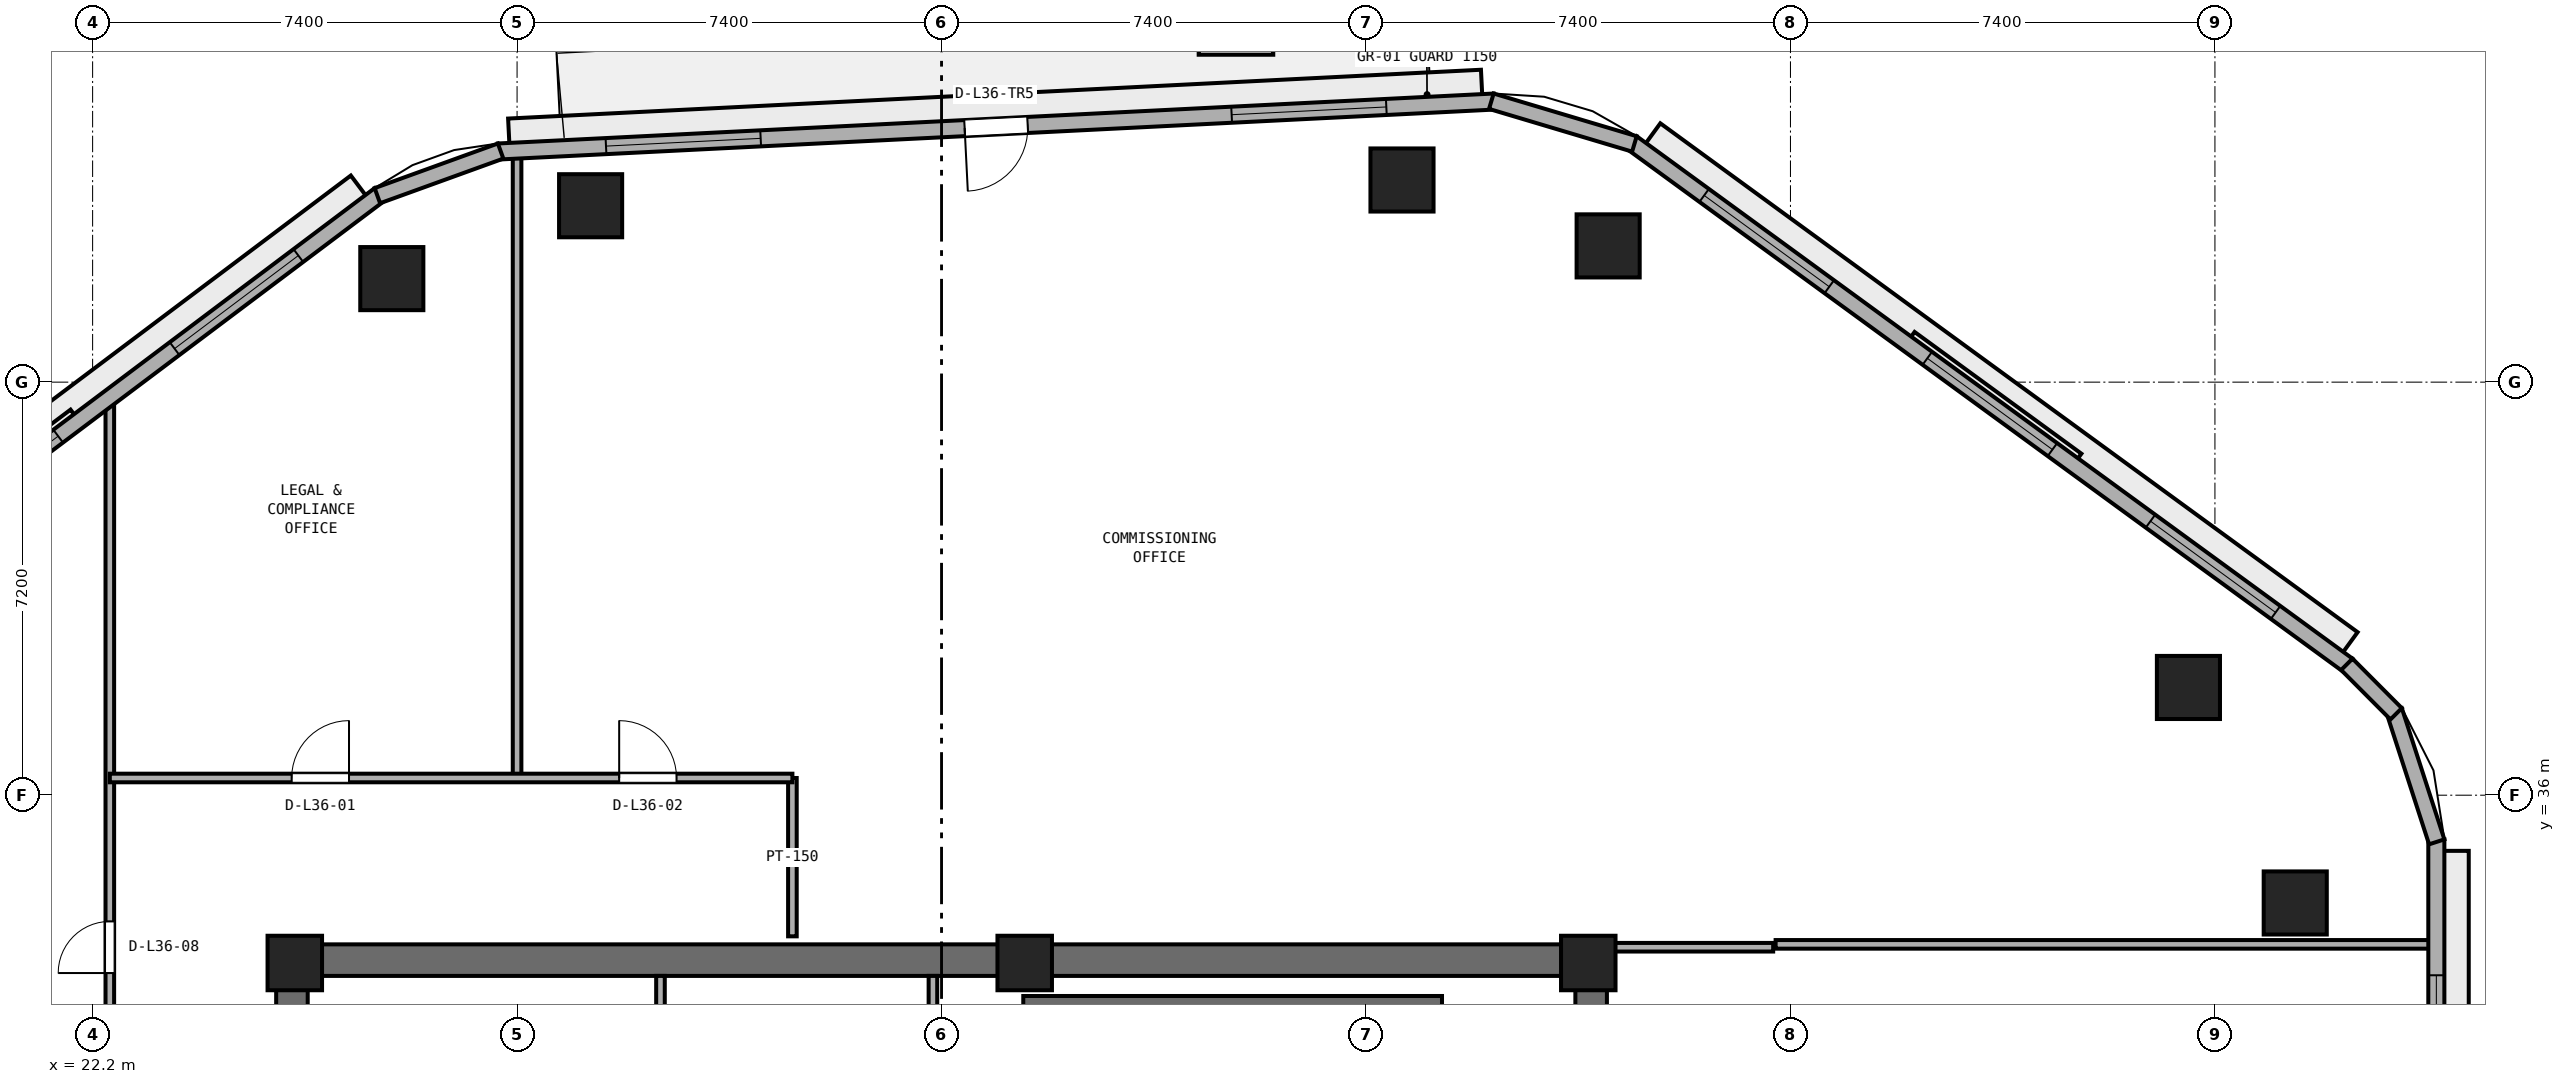
"""IFC4 building model, lengths in metres.
Left out: names, types, materials, properties, quantities, classifications, styles, units other than length and angle.
Written with IfcOpenShell. Run it as: python <this file> out.ifc"""

import sys

from ifc_helpers import new_model, si_unit, direction, frame, frame_2d, origin, origin_2d, place, context, subcontext, project, spatial, rectangle, extrude, element, fill, save


model = new_model("IFC4")
c1 = context("Model", 3, precision=1e-05, world=origin(), true_north=direction((0.0, 1.0)))
c2 = subcontext(c1, "Body", "Model", "MODEL_VIEW")
j1 = project(units=[si_unit("LENGTHUNIT", "METRE"), si_unit("PLANEANGLEUNIT", "RADIAN")], contexts=[c1])
p1 = place(None, origin())
s1 = spatial("IfcSite", under=j1, at=p1, CompositionType="ELEMENT")
p2 = place(p1, origin())
s2 = spatial("IfcBuilding", under=s1, at=p2, CompositionType="ELEMENT")
p3 = place(p2, frame((0.0, 0.0, 144.0)))
s3 = spatial("IfcBuildingStorey", under=s2, at=p3, CompositionType="ELEMENT", Elevation=144.0)
p4 = place(p3, frame((25.4, 33.125, 0.0), z_axis=(0.0, 0.0, 1.0), x_axis=(1.0, 0.0, 0.0)))
e1 = element("IfcWall", 1, at=p4, inside=s3, PredefinedType="SHEAR", context=c2, shape_type="SweptSolid", body=[
    extrude(rectangle(XDim=23.2, YDim=0.55, at=frame_2d((11.6, 0.0))), origin(), (0.0, 0.0, 1.0), 3.54),
])
p5 = place(p3, frame((25.675, 17.55, 0.0), z_axis=(0.0, 0.0, 1.0), x_axis=(0.0, 1.0, 0.0)))
e2 = element("IfcWall", 2, at=p5, inside=s3, PredefinedType="SHEAR", context=c2, shape_type="SweptSolid", body=[
    extrude(rectangle(XDim=15.3, YDim=0.55, at=frame_2d((7.65, 0.0))), origin(), (0.0, 0.0, 1.0), 3.54),
])
p6 = place(p5, frame((6.9, 0.0, 0.0)))
e3 = element("IfcOpeningElement", 3, at=p6, cuts=e2, PredefinedType="OPENING", context=c2, shape_type="SweptSolid", body=[
    extrude(rectangle(XDim=1.5, YDim=2.15, at=frame_2d((0.75, 1.075))), frame((0.0, 0.285, 0.0), z_axis=(0.0, -1.0, 0.0), x_axis=(1.0, 0.0, 0.0)), (0.0, 0.0, 1.0), 0.57),
])
p7 = place(p3, frame((48.325, 17.55, 0.0), z_axis=(0.0, 0.0, 1.0), x_axis=(0.0, 1.0, 0.0)))
e4 = element("IfcWall", 4, at=p7, inside=s3, PredefinedType="SHEAR", context=c2, shape_type="SweptSolid", body=[
    extrude(rectangle(XDim=15.3, YDim=0.55, at=frame_2d((7.65, 0.0))), origin(), (0.0, 0.0, 1.0), 3.54),
])
p8 = place(p7, frame((5.75, 0.0, 0.0)))
e5 = element("IfcOpeningElement", 5, at=p8, cuts=e4, PredefinedType="OPENING", context=c2, shape_type="SweptSolid", body=[
    extrude(rectangle(XDim=1.5, YDim=2.15, at=frame_2d((0.75, 1.075))), frame((0.0, 0.285, 0.0), z_axis=(0.0, -1.0, 0.0), x_axis=(1.0, 0.0, 0.0)), (0.0, 0.0, 1.0), 0.57),
])
for number, where, z_axis, x_axis in (
    (6, (48.275, 33.075, 0.0), (0.0, 0.0, 1.0), (1.0, 0.0, 0.0)),
    (7, (38.45, 33.075, 0.0), (0.0, 0.0, 1.0), (1.0, 0.0, 0.0)),
    (8, (25.725, 33.075, 0.0), (0.0, 0.0, 1.0), (1.0, 0.0, 0.0)),
):
    element("IfcColumn", number, at=place(p3, frame(where, z_axis=z_axis, x_axis=x_axis)), inside=s3, PredefinedType="PILASTER", context=c2, shape_type="SweptSolid", body=[
        extrude(rectangle(XDim=0.95, YDim=0.95, at=origin_2d()), origin(), (0.0, 0.0, 1.0), 3.8),
    ])
for number, where, z_axis, x_axis in (
    (9, (60.6, 34.122, 0.0), (0.0, 0.0, 1.0), (1.0, 0.0, 0.0)),
    (10, (58.738, 37.878, 0.0), (0.0, 0.0, 1.0), (1.0, 0.0, 0.0)),
    (11, (48.622, 45.575, 0.0), (0.0, 0.0, 1.0), (1.0, 0.0, 0.0)),
    (12, (45.028, 46.724, 0.0), (0.0, 0.0, 1.0), (1.0, 0.0, 0.0)),
    (13, (30.882, 46.275, 0.0), (0.0, 0.0, 1.0), (1.0, 0.0, 0.0)),
    (14, (27.416, 45.004, 0.0), (0.0, 0.0, 1.0), (1.0, 0.0, 0.0)),
):
    element("IfcColumn", number, at=place(p3, frame(where, z_axis=z_axis, x_axis=x_axis)), inside=s3, PredefinedType="COLUMN", context=c2, shape_type="SweptSolid", body=[
        extrude(rectangle(XDim=1.1, YDim=1.1, at=origin_2d()), origin(), (0.0, 0.0, 1.0), 3.8),
    ])
p9 = place(p3, frame((38.425, 32.375, 0.0), z_axis=(0.0, 0.0, 1.0), x_axis=(1.0, 0.0, 0.0)))
e15 = element("IfcWall", 15, at=p9, inside=s3, PredefinedType="SHEAR", context=c2, shape_type="SweptSolid", body=[
    extrude(rectangle(XDim=7.3, YDim=0.25, at=frame_2d((3.65, 0.0))), origin(), (0.0, 0.0, 1.0), 3.54),
])
for number, where, z_axis, x_axis in (
    (16, (32.1, 30.65, 0.0), (0.0, 0.0, 1.0), (0.0, 1.0, 0.0)),
    (17, (36.85, 30.65, 0.0), (0.0, 0.0, 1.0), (0.0, 1.0, 0.0)),
):
    element("IfcWall", number, at=place(p3, frame(where, z_axis=z_axis, x_axis=x_axis)), inside=s3, PredefinedType="PARTITIONING", context=c2, shape_type="SweptSolid", body=[
        extrude(rectangle(XDim=2.2, YDim=0.15, at=frame_2d((1.1, 0.0))), origin(), (0.0, 0.0, 1.0), 3.54),
    ])
p10 = place(p3, frame((34.4, 33.54, 0.0), z_axis=(0.0, 0.0, 1.0), x_axis=(0.0, 1.0, 0.0)))
e18 = element("IfcWall", 18, at=p10, inside=s3, PredefinedType="PARTITIONING", context=c2, shape_type="SweptSolid", body=[
    extrude(rectangle(XDim=2.76, YDim=0.15, at=frame_2d((1.38, 0.0))), origin(), (0.0, 0.0, 1.0), 3.54),
])
p11 = place(p3, frame((29.6, 36.3, 0.0), z_axis=(0.0, 0.0, 1.0), x_axis=(0.0, 1.0, 0.0)))
e19 = element("IfcWall", 19, at=p11, inside=s3, PredefinedType="PARTITIONING", context=c2, shape_type="SweptSolid", body=[
    extrude(rectangle(XDim=10.872, YDim=0.15, at=frame_2d((5.436, 0.0))), origin(), (0.0, 0.0, 1.0), 3.54),
])
p12 = place(p3, frame((22.5, 26.55, 0.0), z_axis=(0.0, 0.0, 1.0), x_axis=(0.0, 1.0, 0.0)))
e20 = element("IfcWall", 20, at=p12, inside=s3, PredefinedType="PARTITIONING", context=c2, shape_type="SweptSolid", body=[
    extrude(rectangle(XDim=16.42, YDim=0.15, at=frame_2d((8.21, 0.0))), origin(), (0.0, 0.0, 1.0), 3.54),
])
p13 = place(p12, frame((6.35, 0.0, 0.0)))
e21 = element("IfcOpeningElement", 21, at=p13, cuts=e20, PredefinedType="OPENING", context=c2, shape_type="SweptSolid", body=[
    extrude(rectangle(XDim=0.9, YDim=2.1, at=frame_2d((0.45, 1.05))), frame((0.0, 0.085, 0.0), z_axis=(0.0, -1.0, 0.0), x_axis=(1.0, 0.0, 0.0)), (0.0, 0.0, 1.0), 0.17),
])
p14 = place(p3, frame((48.74, 33.35, 0.0), z_axis=(0.0, 0.0, 1.0), x_axis=(1.0, 0.0, 0.0)))
e22 = element("IfcWall", 22, at=p14, inside=s3, PredefinedType="PARTITIONING", context=c2, shape_type="SweptSolid", body=[
    extrude(rectangle(XDim=2.759, YDim=0.15, at=frame_2d((1.379, 0.0))), origin(), (0.0, 0.0, 1.0), 2.923),
])
p15 = place(p3, frame((51.541, 33.4, 0.0), z_axis=(0.0, 0.0, 1.0), x_axis=(1.0, 0.0, 0.0)))
e23 = element("IfcWall", 23, at=p15, inside=s3, PredefinedType="PARTITIONING", context=c2, shape_type="SweptSolid", body=[
    extrude(rectangle(XDim=11.454, YDim=0.15, at=frame_2d((5.727, 0.0))), origin(), (0.0, 0.0, 1.0), 2.923),
])
p16 = place(p3, frame((22.5, 36.3, 0.0), z_axis=(0.0, 0.0, 1.0), x_axis=(1.0, 0.0, 0.0)))
e24 = element("IfcWall", 24, at=p16, inside=s3, PredefinedType="PARTITIONING", context=c2, shape_type="SweptSolid", body=[
    extrude(rectangle(XDim=11.9, YDim=0.15, at=frame_2d((5.95, 0.0))), origin(), (0.0, 0.0, 1.0), 3.54),
])
p17 = place(p16, frame((3.17, 0.0, 0.0)))
e25 = element("IfcOpeningElement", 25, at=p17, cuts=e24, PredefinedType="OPENING", context=c2, shape_type="SweptSolid", body=[
    extrude(rectangle(XDim=1.0, YDim=2.12, at=frame_2d((0.5, 1.06))), frame((0.0, 0.085, 0.0), z_axis=(0.0, -1.0, 0.0), x_axis=(1.0, 0.0, 0.0)), (0.0, 0.0, 1.0), 0.17),
])
p18 = place(p16, frame((8.88, 0.0, 0.0)))
e26 = element("IfcOpeningElement", 26, at=p18, cuts=e24, PredefinedType="OPENING", context=c2, shape_type="SweptSolid", body=[
    extrude(rectangle(XDim=1.0, YDim=2.12, at=frame_2d((0.5, 1.06))), frame((0.0, 0.085, 0.0), z_axis=(0.0, -1.0, 0.0), x_axis=(1.0, 0.0, 0.0)), (0.0, 0.0, 1.0), 0.17),
])
p19 = place(p3, frame((63.06, 16.418, 0.0), z_axis=(0.0, 0.0, 1.0), x_axis=(0.0, 1.0, 0.0)))
e27 = element("IfcWall", 27, at=p19, inside=s3, PredefinedType="STANDARD", context=c2, shape_type="SweptSolid", body=[
    extrude(rectangle(XDim=18.812, YDim=0.28, at=frame_2d((9.406, 0.0))), origin(), (0.0, 0.0, 1.0), 3.54),
])
p20 = place(p19, frame((13.743, 0.0, 0.9)))
e28 = element("IfcOpeningElement", 28, at=p20, cuts=e27, PredefinedType="OPENING", context=c2, shape_type="SweptSolid", body=[
    extrude(rectangle(XDim=2.7, YDim=1.75, at=frame_2d((1.35, 0.875))), frame((0.0, 0.15, 0.0), z_axis=(0.0, -1.0, 0.0), x_axis=(1.0, 0.0, 0.0)), (0.0, 0.0, 1.0), 0.3),
])
p21 = place(p3, frame((61.516, 38.267, 0.0), z_axis=(0.0, 0.0, 1.0), x_axis=(-0.807812505785, 0.589439526582, 0.0)))
e29 = element("IfcWall", 29, at=p21, inside=s3, PredefinedType="STANDARD", context=c2, shape_type="SweptSolid", body=[
    extrude(rectangle(XDim=15.448, YDim=0.28, at=frame_2d((7.724, 0.0))), origin(), (0.0, 0.0, 1.0), 3.54),
])
p22 = place(p21, frame((1.558, 0.0, 0.9)))
e30 = element("IfcOpeningElement", 30, at=p22, cuts=e29, PredefinedType="OPENING", context=c2, shape_type="SweptSolid", body=[
    extrude(rectangle(XDim=2.7, YDim=1.75, at=frame_2d((1.35, 0.875))), frame((0.0, 0.15, 0.0), z_axis=(0.0, -1.0, 0.0), x_axis=(1.0, 0.0, 0.0)), (0.0, 0.0, 1.0), 0.3),
])
p23 = place(p21, frame((6.374, 0.0, 0.9)))
e31 = element("IfcOpeningElement", 31, at=p23, cuts=e29, PredefinedType="OPENING", context=c2, shape_type="SweptSolid", body=[
    extrude(rectangle(XDim=2.7, YDim=1.75, at=frame_2d((1.35, 0.875))), frame((0.0, 0.15, 0.0), z_axis=(0.0, -1.0, 0.0), x_axis=(1.0, 0.0, 0.0)), (0.0, 0.0, 1.0), 0.3),
])
p24 = place(p21, frame((11.19, 0.0, 0.9)))
e32 = element("IfcOpeningElement", 32, at=p24, cuts=e29, PredefinedType="OPENING", context=c2, shape_type="SweptSolid", body=[
    extrude(rectangle(XDim=2.7, YDim=1.75, at=frame_2d((1.35, 0.875))), frame((0.0, 0.15, 0.0), z_axis=(0.0, -1.0, 0.0), x_axis=(1.0, 0.0, 0.0)), (0.0, 0.0, 1.0), 0.3),
])
p25 = place(p3, frame((46.632, 48.091, 0.0), z_axis=(0.0, 0.0, 1.0), x_axis=(-0.998744129094, -0.050101542886, 0.0)))
e33 = element("IfcWall", 33, at=p25, inside=s3, PredefinedType="STANDARD", context=c2, shape_type="SweptSolid", body=[
    extrude(rectangle(XDim=17.382, YDim=0.28, at=frame_2d((8.691, 0.0))), origin(), (0.0, 0.0, 1.0), 3.54),
])
p26 = place(p25, frame((8.141, 0.0, 0.0)))
e34 = element("IfcOpeningElement", 34, at=p26, cuts=e33, PredefinedType="OPENING", context=c2, shape_type="SweptSolid", body=[
    extrude(rectangle(XDim=1.1, YDim=2.2, at=frame_2d((0.55, 1.1))), frame((0.0, 0.15, 0.0), z_axis=(0.0, -1.0, 0.0), x_axis=(1.0, 0.0, 0.0)), (0.0, 0.0, 1.0), 0.3),
])
p27 = place(p25, frame((1.88, 0.0, 0.9)))
e35 = element("IfcOpeningElement", 35, at=p27, cuts=e33, PredefinedType="OPENING", context=c2, shape_type="SweptSolid", body=[
    extrude(rectangle(XDim=2.7, YDim=1.75, at=frame_2d((1.35, 0.875))), frame((0.0, 0.15, 0.0), z_axis=(0.0, -1.0, 0.0), x_axis=(1.0, 0.0, 0.0)), (0.0, 0.0, 1.0), 0.3),
])
p28 = place(p25, frame((12.802, 0.0, 0.9)))
e36 = element("IfcOpeningElement", 36, at=p28, cuts=e33, PredefinedType="OPENING", context=c2, shape_type="SweptSolid", body=[
    extrude(rectangle(XDim=2.7, YDim=1.75, at=frame_2d((1.35, 0.875))), frame((0.0, 0.15, 0.0), z_axis=(0.0, -1.0, 0.0), x_axis=(1.0, 0.0, 0.0)), (0.0, 0.0, 1.0), 0.3),
])
p29 = place(p3, frame((27.201, 46.47, 0.0), z_axis=(0.0, 0.0, 1.0), x_axis=(-0.799280853427, -0.600957666849, 0.0)))
e37 = element("IfcWall", 37, at=p29, inside=s3, PredefinedType="STANDARD", context=c2, shape_type="SweptSolid", body=[
    extrude(rectangle(XDim=16.716, YDim=0.28, at=frame_2d((8.358, 0.0))), origin(), (0.0, 0.0, 1.0), 3.54),
])
p30 = place(p29, frame((1.769, 0.0, 0.9)))
e38 = element("IfcOpeningElement", 38, at=p30, cuts=e37, PredefinedType="OPENING", context=c2, shape_type="SweptSolid", body=[
    extrude(rectangle(XDim=2.7, YDim=1.75, at=frame_2d((1.35, 0.875))), frame((0.0, 0.15, 0.0), z_axis=(0.0, -1.0, 0.0), x_axis=(1.0, 0.0, 0.0)), (0.0, 0.0, 1.0), 0.3),
])
p31 = place(p29, frame((7.008, 0.0, 0.9)))
e39 = element("IfcOpeningElement", 39, at=p31, cuts=e37, PredefinedType="OPENING", context=c2, shape_type="SweptSolid", body=[
    extrude(rectangle(XDim=2.7, YDim=1.75, at=frame_2d((1.35, 0.875))), frame((0.0, 0.15, 0.0), z_axis=(0.0, -1.0, 0.0), x_axis=(1.0, 0.0, 0.0)), (0.0, 0.0, 1.0), 0.3),
])
p32 = place(p29, frame((12.247, 0.0, 0.9)))
e40 = element("IfcOpeningElement", 40, at=p32, cuts=e37, PredefinedType="OPENING", context=c2, shape_type="SweptSolid", body=[
    extrude(rectangle(XDim=2.7, YDim=1.75, at=frame_2d((1.35, 0.875))), frame((0.0, 0.15, 0.0), z_axis=(0.0, -1.0, 0.0), x_axis=(1.0, 0.0, 0.0)), (0.0, 0.0, 1.0), 0.3),
])
p33 = place(p3, frame((63.067, 35.187, 0.0), z_axis=(0.0, 0.0, 1.0), x_axis=(-0.308390504294, 0.951259847182, 0.0)))
e41 = element("IfcWall", 41, at=p33, inside=s3, PredefinedType="STANDARD", context=c2, shape_type="SweptSolid", body=[
    extrude(rectangle(XDim=2.405, YDim=0.28, at=frame_2d((1.203, 0.0))), origin(), (0.0, 0.0, 1.0), 3.54),
])
p34 = place(p3, frame((62.359, 37.419, 0.0), z_axis=(0.0, 0.0, 1.0), x_axis=(-0.706003104649, 0.708208737751, 0.0)))
e42 = element("IfcWall", 42, at=p34, inside=s3, PredefinedType="STANDARD", context=c2, shape_type="SweptSolid", body=[
    extrude(rectangle(XDim=1.218, YDim=0.28, at=frame_2d((0.609, 0.0))), origin(), (0.0, 0.0, 1.0), 3.54),
])
p35 = place(p3, frame((49.079, 47.352, 0.0), z_axis=(0.0, 0.0, 1.0), x_axis=(-0.958207501709, 0.286074087726, 0.0)))
e43 = element("IfcWall", 43, at=p35, inside=s3, PredefinedType="STANDARD", context=c2, shape_type="SweptSolid", body=[
    extrude(rectangle(XDim=2.603, YDim=0.28, at=frame_2d((1.302, 0.0))), origin(), (0.0, 0.0, 1.0), 3.54),
])
p36 = place(p3, frame((29.313, 47.228, 0.0), z_axis=(0.0, 0.0, 1.0), x_axis=(-0.940226330758, -0.340550212084, 0.0)))
e44 = element("IfcWall", 44, at=p36, inside=s3, PredefinedType="STANDARD", context=c2, shape_type="SweptSolid", body=[
    extrude(rectangle(XDim=2.285, YDim=0.28, at=frame_2d((1.142, 0.0))), origin(), (0.0, 0.0, 1.0), 3.54),
])
p37 = place(p17, origin())
e45 = element("IfcDoor", 45, at=p37, inside=s3, OperationType="SINGLE_SWING_RIGHT", PredefinedType="DOOR", context=c2, shape_type="SweptSolid", body=[
    extrude(rectangle(XDim=1.0, YDim=2.12, at=frame_2d((0.5, 1.06))), frame((0.0, 0.025, 0.0), z_axis=(0.0, -1.0, 0.0), x_axis=(1.0, 0.0, 0.0)), (0.0, 0.0, 1.0), 0.05),
])
fill(e25, e45)
p38 = place(p18, origin())
e46 = element("IfcDoor", 46, at=p38, inside=s3, OperationType="SINGLE_SWING_LEFT", PredefinedType="DOOR", context=c2, shape_type="SweptSolid", body=[
    extrude(rectangle(XDim=1.0, YDim=2.12, at=frame_2d((0.5, 1.06))), frame((0.0, 0.025, 0.0), z_axis=(0.0, -1.0, 0.0), x_axis=(1.0, 0.0, 0.0)), (0.0, 0.0, 1.0), 0.05),
])
fill(e26, e46)
p39 = place(p13, origin())
e47 = element("IfcDoor", 47, at=p39, inside=s3, OperationType="SINGLE_SWING_LEFT", PredefinedType="DOOR", context=c2, shape_type="SweptSolid", body=[
    extrude(rectangle(XDim=0.9, YDim=2.1, at=frame_2d((0.45, 1.05))), frame((0.0, 0.025, 0.0), z_axis=(0.0, -1.0, 0.0), x_axis=(1.0, 0.0, 0.0)), (0.0, 0.0, 1.0), 0.05),
])
fill(e21, e47)
p40 = place(p20, origin())
e48 = element("IfcWindow", 48, at=p40, inside=s3, PartitioningType="SINGLE_PANEL", PredefinedType="WINDOW", context=c2, shape_type="SweptSolid", body=[
    extrude(rectangle(XDim=2.7, YDim=1.75, at=frame_2d((1.35, 0.875))), frame((0.0, 0.03, 0.0), z_axis=(0.0, -1.0, 0.0), x_axis=(1.0, 0.0, 0.0)), (0.0, 0.0, 1.0), 0.06),
])
fill(e28, e48)
p41 = place(p22, origin())
e49 = element("IfcWindow", 49, at=p41, inside=s3, PartitioningType="SINGLE_PANEL", PredefinedType="WINDOW", context=c2, shape_type="SweptSolid", body=[
    extrude(rectangle(XDim=2.7, YDim=1.75, at=frame_2d((1.35, 0.875))), frame((0.0, 0.03, 0.0), z_axis=(0.0, -1.0, 0.0), x_axis=(1.0, 0.0, 0.0)), (0.0, 0.0, 1.0), 0.06),
])
fill(e30, e49)
p42 = place(p23, origin())
e50 = element("IfcWindow", 50, at=p42, inside=s3, PartitioningType="SINGLE_PANEL", PredefinedType="WINDOW", context=c2, shape_type="SweptSolid", body=[
    extrude(rectangle(XDim=2.7, YDim=1.75, at=frame_2d((1.35, 0.875))), frame((0.0, 0.03, 0.0), z_axis=(0.0, -1.0, 0.0), x_axis=(1.0, 0.0, 0.0)), (0.0, 0.0, 1.0), 0.06),
])
fill(e31, e50)
p43 = place(p24, origin())
e51 = element("IfcWindow", 51, at=p43, inside=s3, PartitioningType="SINGLE_PANEL", PredefinedType="WINDOW", context=c2, shape_type="SweptSolid", body=[
    extrude(rectangle(XDim=2.7, YDim=1.75, at=frame_2d((1.35, 0.875))), frame((0.0, 0.03, 0.0), z_axis=(0.0, -1.0, 0.0), x_axis=(1.0, 0.0, 0.0)), (0.0, 0.0, 1.0), 0.06),
])
fill(e32, e51)
p44 = place(p26, origin())
e52 = element("IfcDoor", 52, at=p44, inside=s3, OperationType="SINGLE_SWING_RIGHT", PredefinedType="DOOR", context=c2, shape_type="SweptSolid", body=[
    extrude(rectangle(XDim=1.1, YDim=2.2, at=frame_2d((0.55, 1.1))), frame((0.0, 0.025, 0.0), z_axis=(0.0, -1.0, 0.0), x_axis=(1.0, 0.0, 0.0)), (0.0, 0.0, 1.0), 0.05),
])
fill(e34, e52)
p45 = place(p27, origin())
e53 = element("IfcWindow", 53, at=p45, inside=s3, PartitioningType="SINGLE_PANEL", PredefinedType="WINDOW", context=c2, shape_type="SweptSolid", body=[
    extrude(rectangle(XDim=2.7, YDim=1.75, at=frame_2d((1.35, 0.875))), frame((0.0, 0.03, 0.0), z_axis=(0.0, -1.0, 0.0), x_axis=(1.0, 0.0, 0.0)), (0.0, 0.0, 1.0), 0.06),
])
fill(e35, e53)
p46 = place(p28, origin())
e54 = element("IfcWindow", 54, at=p46, inside=s3, PartitioningType="SINGLE_PANEL", PredefinedType="WINDOW", context=c2, shape_type="SweptSolid", body=[
    extrude(rectangle(XDim=2.7, YDim=1.75, at=frame_2d((1.35, 0.875))), frame((0.0, 0.03, 0.0), z_axis=(0.0, -1.0, 0.0), x_axis=(1.0, 0.0, 0.0)), (0.0, 0.0, 1.0), 0.06),
])
fill(e36, e54)
p47 = place(p30, origin())
e55 = element("IfcWindow", 55, at=p47, inside=s3, PartitioningType="SINGLE_PANEL", PredefinedType="WINDOW", context=c2, shape_type="SweptSolid", body=[
    extrude(rectangle(XDim=2.7, YDim=1.75, at=frame_2d((1.35, 0.875))), frame((0.0, 0.03, 0.0), z_axis=(0.0, -1.0, 0.0), x_axis=(1.0, 0.0, 0.0)), (0.0, 0.0, 1.0), 0.06),
])
fill(e38, e55)
p48 = place(p31, origin())
e56 = element("IfcWindow", 56, at=p48, inside=s3, PartitioningType="SINGLE_PANEL", PredefinedType="WINDOW", context=c2, shape_type="SweptSolid", body=[
    extrude(rectangle(XDim=2.7, YDim=1.75, at=frame_2d((1.35, 0.875))), frame((0.0, 0.03, 0.0), z_axis=(0.0, -1.0, 0.0), x_axis=(1.0, 0.0, 0.0)), (0.0, 0.0, 1.0), 0.06),
])
fill(e39, e56)
save(model, sys.argv[1])
